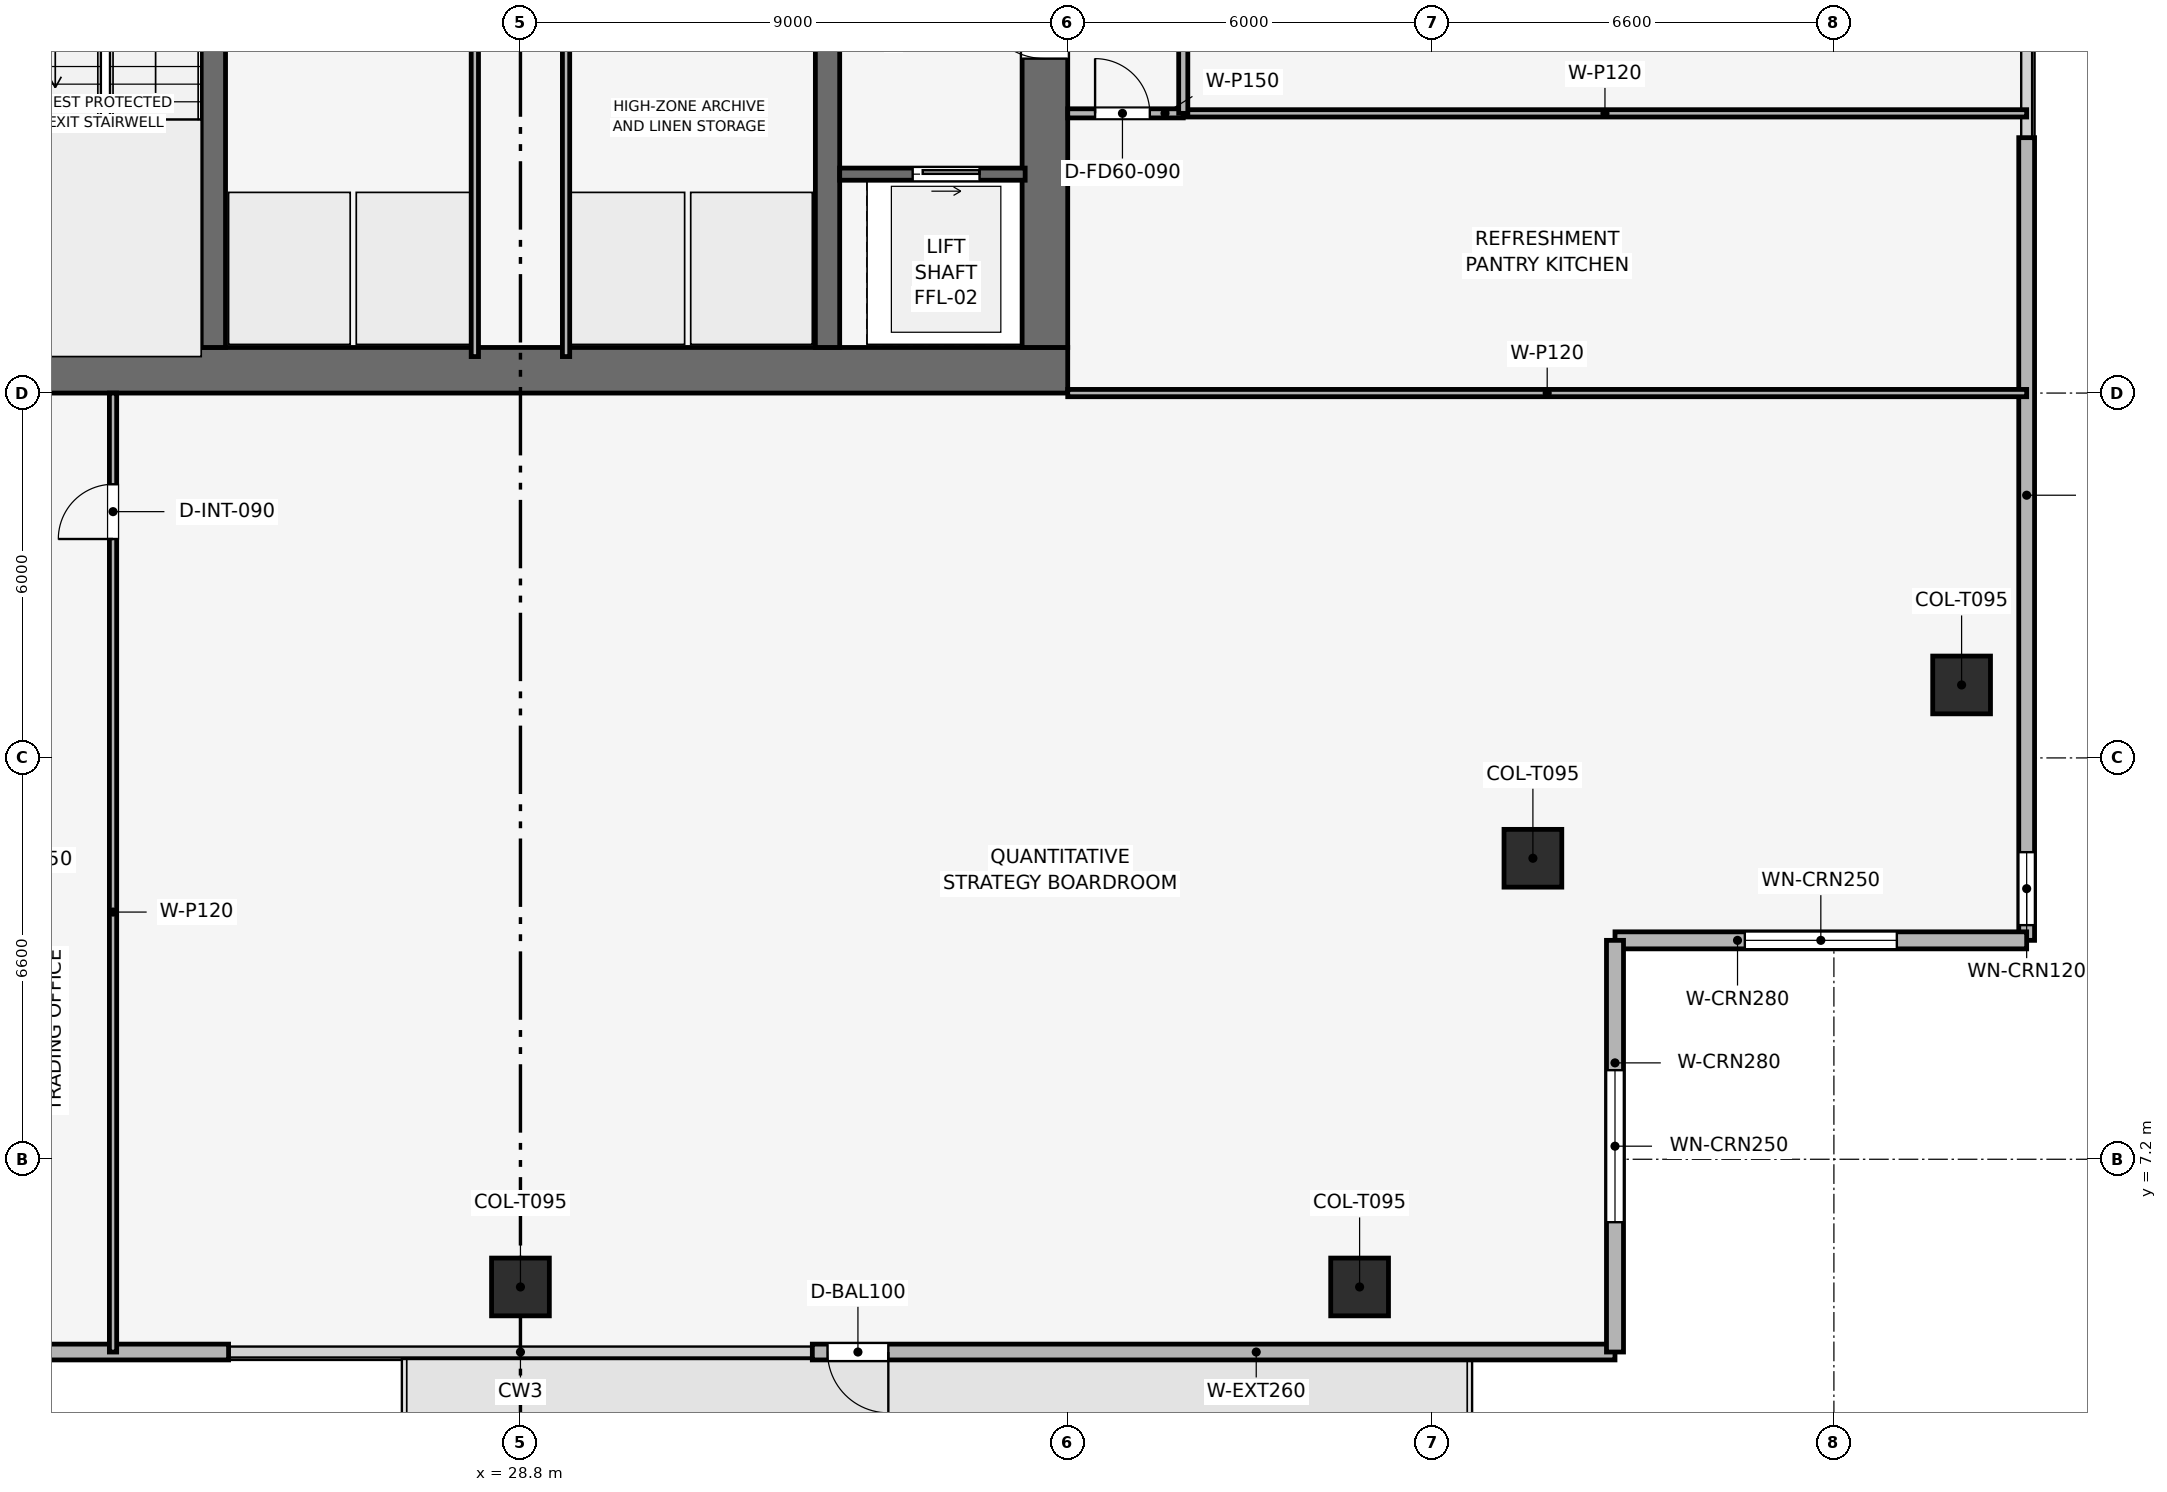
"""IFC4 building model, lengths in metres.
Left out: names, types, materials, properties, quantities, classifications, styles, units other than length and angle.
Written with IfcOpenShell. Run it as: python <this file> out.ifc"""

import sys

from ifc_helpers import new_model, si_unit, direction, frame, frame_2d, origin, origin_2d, place, context, subcontext, project, spatial, rectangle, extrude, element, fill, save


model = new_model("IFC4")
c1 = context("Model", 3, precision=1e-05, world=origin(), true_north=direction((0.0, 1.0)))
c2 = subcontext(c1, "Body", "Model", "MODEL_VIEW")
j1 = project(units=[si_unit("LENGTHUNIT", "METRE"), si_unit("PLANEANGLEUNIT", "RADIAN")], contexts=[c1])
p1 = place(None, origin())
s1 = spatial("IfcSite", under=j1, at=p1, CompositionType="ELEMENT")
p2 = place(p1, origin())
s2 = spatial("IfcBuilding", under=s1, at=p2, CompositionType="ELEMENT")
p3 = place(p2, frame((0.0, 0.0, 269.1)))
s3 = spatial("IfcBuildingStorey", under=s2, at=p3, CompositionType="ELEMENT", Elevation=269.1)
p4 = place(p3, frame((19.8, 20.175, 0.0), z_axis=(0.0, 0.0, 1.0), x_axis=(1.0, 0.0, 0.0)))
e1 = element("IfcWall", 1, at=p4, inside=s3, PredefinedType="SHEAR", context=c2, shape_type="SweptSolid", body=[
    extrude(rectangle(XDim=18.0, YDim=0.75, at=frame_2d((9.0, 0.0))), origin(), (0.0, 0.0, 1.0), 3.75),
])
p5 = place(p3, frame((37.425, 20.55, 0.0), z_axis=(0.0, 0.0, 1.0), x_axis=(0.0, 1.0, 0.0)))
e2 = element("IfcWall", 2, at=p5, inside=s3, PredefinedType="SHEAR", context=c2, shape_type="SweptSolid", body=[
    extrude(rectangle(XDim=16.5, YDim=0.75, at=frame_2d((8.25, 0.0))), origin(), (0.0, 0.0, 1.0), 3.75),
])
p6 = place(p5, frame((4.75, 0.0, 0.0)))
e3 = element("IfcOpeningElement", 3, at=p6, cuts=e2, PredefinedType="OPENING", context=c2, shape_type="SweptSolid", body=[
    extrude(rectangle(XDim=1.1, YDim=2.15, at=frame_2d((0.55, 1.075))), frame((0.0, 0.385, 0.0), z_axis=(0.0, -1.0, 0.0), x_axis=(1.0, 0.0, 0.0)), (0.0, 0.0, 1.0), 0.77),
])
for number, where, z_axis, x_axis in (
    (4, (23.75, 20.55, 0.0), (0.0, 0.0, 1.0), (0.0, 1.0, 0.0)),
    (5, (33.85, 20.55, 0.0), (0.0, 0.0, 1.0), (0.0, 1.0, 0.0)),
):
    element("IfcWall", number, at=place(p3, frame(where, z_axis=z_axis, x_axis=x_axis)), inside=s3, PredefinedType="SHEAR", context=c2, shape_type="SweptSolid", body=[
        extrude(rectangle(XDim=16.5, YDim=0.4, at=frame_2d((8.25, 0.0))), origin(), (0.0, 0.0, 1.0), 3.75),
    ])
for number, where, z_axis, x_axis in (
    (6, (28.8, 5.1, 0.003), (0.0, 0.0, 1.0), (1.0, 0.0, 0.0)),
    (7, (42.6, 5.1, 0.003), (0.0, 0.0, 1.0), (1.0, 0.0, 0.0)),
    (8, (52.5, 15.0, 0.003), (0.0, 0.0, 1.0), (1.0, 0.0, 0.0)),
    (9, (45.45, 12.15, 0.003), (0.0, 0.0, 1.0), (1.0, 0.0, 0.0)),
):
    element("IfcColumn", number, at=place(p3, frame(where, z_axis=z_axis, x_axis=x_axis)), inside=s3, PredefinedType="COLUMN", context=c2, shape_type="SweptSolid", body=[
        extrude(rectangle(XDim=0.95, YDim=0.95, at=origin_2d()), origin(), (0.0, 0.0, 1.0), 3.494),
    ])
p7 = place(p3, frame((46.8, 4.03, 0.0), z_axis=(0.0, 0.0, 1.0), x_axis=(-1.0, 0.0, 0.0)))
e10 = element("IfcWall", 10, at=p7, inside=s3, PredefinedType="SOLIDWALL", context=c2, shape_type="SweptSolid", body=[
    extrude(rectangle(XDim=13.2, YDim=0.26, at=frame_2d((6.6, 0.0))), origin(), (0.0, 0.0, 1.0), 3.5),
])
p8 = place(p7, frame((11.95, 0.0, 0.0)))
e11 = element("IfcOpeningElement", 11, at=p8, cuts=e10, PredefinedType="OPENING", context=c2, shape_type="SweptSolid", body=[
    extrude(rectangle(XDim=1.0, YDim=2.2, at=frame_2d((0.5, 1.1))), frame((0.0, 0.14, 0.0), z_axis=(0.0, -1.0, 0.0), x_axis=(1.0, 0.0, 0.0)), (0.0, 0.0, 1.0), 0.28),
])
p9 = place(p3, frame((24.0, 4.03, 0.0), z_axis=(0.0, 0.0, 1.0), x_axis=(-1.0, 0.0, 0.0)))
e12 = element("IfcWall", 12, at=p9, inside=s3, PredefinedType="SOLIDWALL", context=c2, shape_type="SweptSolid", body=[
    extrude(rectangle(XDim=13.2, YDim=0.26, at=frame_2d((6.6, 0.0))), origin(), (0.0, 0.0, 1.0), 3.5),
])
p10 = place(p9, frame((11.75, 0.0, 0.9)))
e13 = element("IfcOpeningElement", 13, at=p10, cuts=e12, PredefinedType="OPENING", context=c2, shape_type="SweptSolid", body=[
    extrude(rectangle(XDim=1.2, YDim=2.1, at=frame_2d((0.6, 1.05))), frame((0.0, 0.14, 0.0), z_axis=(0.0, -1.0, 0.0), x_axis=(1.0, 0.0, 0.0)), (0.0, 0.0, 1.0), 0.28),
])
p11 = place(p3, frame((53.57, 24.0, 0.0), z_axis=(0.0, 0.0, 1.0), x_axis=(0.0, -1.0, 0.0)))
e14 = element("IfcWall", 14, at=p11, inside=s3, PredefinedType="SOLIDWALL", context=c2, shape_type="SweptSolid", body=[
    extrude(rectangle(XDim=13.2, YDim=0.26, at=frame_2d((6.6, 0.0))), origin(), (0.0, 0.0, 1.0), 3.5),
])
p12 = place(p11, frame((11.75, 0.0, 0.9)))
e15 = element("IfcOpeningElement", 15, at=p12, cuts=e14, PredefinedType="OPENING", context=c2, shape_type="SweptSolid", body=[
    extrude(rectangle(XDim=1.2, YDim=2.1, at=frame_2d((0.6, 1.05))), frame((0.0, 0.14, 0.0), z_axis=(0.0, -1.0, 0.0), x_axis=(1.0, 0.0, 0.0)), (0.0, 0.0, 1.0), 0.28),
])
p13 = place(p3, frame((53.57, 10.8, 0.0), z_axis=(0.0, 0.0, 1.0), x_axis=(-1.0, 0.0, 0.0)))
e16 = element("IfcWall", 16, at=p13, inside=s3, PredefinedType="SOLIDWALL", context=c2, shape_type="SweptSolid", body=[
    extrude(rectangle(XDim=6.77, YDim=0.28, at=frame_2d((3.385, 0.0))), origin(), (0.0, 0.0, 1.0), 3.5),
])
p14 = place(p13, frame((2.135, 0.0, 0.9)))
e17 = element("IfcOpeningElement", 17, at=p14, cuts=e16, PredefinedType="OPENING", context=c2, shape_type="SweptSolid", body=[
    extrude(rectangle(XDim=2.5, YDim=1.9, at=frame_2d((1.25, 0.95))), frame((0.0, 0.15, 0.0), z_axis=(0.0, -1.0, 0.0), x_axis=(1.0, 0.0, 0.0)), (0.0, 0.0, 1.0), 0.3),
])
p15 = place(p3, frame((46.8, 10.8, 0.0), z_axis=(0.0, 0.0, 1.0), x_axis=(0.0, -1.0, 0.0)))
e18 = element("IfcWall", 18, at=p15, inside=s3, PredefinedType="SOLIDWALL", context=c2, shape_type="SweptSolid", body=[
    extrude(rectangle(XDim=6.77, YDim=0.28, at=frame_2d((3.385, 0.0))), origin(), (0.0, 0.0, 1.0), 3.5),
])
p16 = place(p15, frame((2.135, 0.0, 0.9)))
e19 = element("IfcOpeningElement", 19, at=p16, cuts=e18, PredefinedType="OPENING", context=c2, shape_type="SweptSolid", body=[
    extrude(rectangle(XDim=2.5, YDim=1.9, at=frame_2d((1.25, 0.95))), frame((0.0, 0.15, 0.0), z_axis=(0.0, -1.0, 0.0), x_axis=(1.0, 0.0, 0.0)), (0.0, 0.0, 1.0), 0.3),
])
p17 = place(p3, frame((34.05, 23.4, 0.0), z_axis=(0.0, 0.0, 1.0), x_axis=(1.0, 0.0, 0.0)))
e20 = element("IfcWall", 20, at=p17, inside=s3, PredefinedType="SHEAR", context=c2, shape_type="SweptSolid", body=[
    extrude(rectangle(XDim=3.05, YDim=0.2, at=frame_2d((1.525, 0.0))), origin(), (0.0, 0.0, 1.0), 3.5),
])
p18 = place(p17, frame((1.2, 0.0, 0.0)))
e21 = element("IfcOpeningElement", 21, at=p18, cuts=e20, PredefinedType="OPENING", context=c2, shape_type="SweptSolid", body=[
    extrude(rectangle(XDim=1.1, YDim=2.15, at=frame_2d((0.55, 1.075))), frame((0.0, 0.11, 0.0), z_axis=(0.0, -1.0, 0.0), x_axis=(1.0, 0.0, 0.0)), (0.0, 0.0, 1.0), 0.22),
])
for number, where, z_axis, x_axis in (
    (22, (28.05, 20.4, 0.0), (0.0, 0.0, 1.0), (0.0, 1.0, 0.0)),
    (23, (29.55, 20.4, 0.0), (0.0, 0.0, 1.0), (0.0, 1.0, 0.0)),
):
    element("IfcWall", number, at=place(p3, frame(where, z_axis=z_axis, x_axis=x_axis)), inside=s3, PredefinedType="PARTITIONING", context=c2, shape_type="SweptSolid", body=[
        extrude(rectangle(XDim=8.15, YDim=0.12, at=frame_2d((4.075, 0.0))), origin(), (0.0, 0.0, 1.0), 3.5),
    ])
p19 = place(p3, frame((22.1, 4.03, 0.0), z_axis=(0.0, 0.0, 1.0), x_axis=(0.0, 1.0, 0.0)))
e24 = element("IfcWall", 24, at=p19, inside=s3, PredefinedType="PARTITIONING", context=c2, shape_type="SweptSolid", body=[
    extrude(rectangle(XDim=15.77, YDim=0.12, at=frame_2d((7.885, 0.0))), origin(), (0.0, 0.0, 1.0), 3.085),
])
p20 = place(p19, frame((13.37, 0.0, 0.0)))
e25 = element("IfcOpeningElement", 25, at=p20, cuts=e24, PredefinedType="OPENING", context=c2, shape_type="SweptSolid", body=[
    extrude(rectangle(XDim=0.9, YDim=2.1, at=frame_2d((0.45, 1.05))), frame((0.0, 0.07, 0.0), z_axis=(0.0, -1.0, 0.0), x_axis=(1.0, 0.0, 0.0)), (0.0, 0.0, 1.0), 0.14),
])
p21 = place(p3, frame((37.8, 19.8, 0.0), z_axis=(0.0, 0.0, 1.0), x_axis=(1.0, 0.0, 0.0)))
e26 = element("IfcWall", 26, at=p21, inside=s3, PredefinedType="PARTITIONING", context=c2, shape_type="SweptSolid", body=[
    extrude(rectangle(XDim=15.77, YDim=0.12, at=frame_2d((7.885, 0.0))), origin(), (0.0, 0.0, 1.0), 3.085),
])
p22 = place(p3, frame((37.8, 24.4, 0.0), z_axis=(0.0, 0.0, 1.0), x_axis=(1.0, 0.0, 0.0)))
e27 = element("IfcWall", 27, at=p22, inside=s3, PredefinedType="PARTITIONING", context=c2, shape_type="SweptSolid", body=[
    extrude(rectangle(XDim=1.9, YDim=0.15, at=frame_2d((0.95, 0.0))), origin(), (0.0, 0.0, 1.0), 3.5),
])
p23 = place(p22, frame((0.45, 0.0, 0.0)))
e28 = element("IfcOpeningElement", 28, at=p23, cuts=e27, PredefinedType="OPENING", context=c2, shape_type="SweptSolid", body=[
    extrude(rectangle(XDim=0.9, YDim=2.1, at=frame_2d((0.45, 1.05))), frame((0.0, 0.085, 0.0), z_axis=(0.0, -1.0, 0.0), x_axis=(1.0, 0.0, 0.0)), (0.0, 0.0, 1.0), 0.17),
])
p24 = place(p3, frame((39.7, 24.4, 0.0), z_axis=(0.0, 0.0, 1.0), x_axis=(1.0, 0.0, 0.0)))
e29 = element("IfcWall", 29, at=p24, inside=s3, PredefinedType="PARTITIONING", context=c2, shape_type="SweptSolid", body=[
    extrude(rectangle(XDim=13.87, YDim=0.12, at=frame_2d((6.935, 0.0))), origin(), (0.0, 0.0, 1.0), 3.085),
])
p25 = place(p3, frame((39.7, 24.4, 0.0), z_axis=(0.0, 0.0, 1.0), x_axis=(0.0, 1.0, 0.0)))
e30 = element("IfcWall", 30, at=p25, inside=s3, PredefinedType="PARTITIONING", context=c2, shape_type="SweptSolid", body=[
    extrude(rectangle(XDim=15.3, YDim=0.15, at=frame_2d((7.65, 0.0))), origin(), (0.0, 0.0, 1.0), 3.085),
])
p26 = place(p25, frame((1.35, 0.0, 0.0)))
e31 = element("IfcOpeningElement", 31, at=p26, cuts=e30, PredefinedType="OPENING", context=c2, shape_type="SweptSolid", body=[
    extrude(rectangle(XDim=0.9, YDim=2.1, at=frame_2d((0.45, 1.05))), frame((0.0, 0.085, 0.0), z_axis=(0.0, -1.0, 0.0), x_axis=(1.0, 0.0, 0.0)), (0.0, 0.0, 1.0), 0.17),
])
p27 = place(p25, frame((4.55, 0.0, 0.0)))
e32 = element("IfcOpeningElement", 32, at=p27, cuts=e30, PredefinedType="OPENING", context=c2, shape_type="SweptSolid", body=[
    extrude(rectangle(XDim=0.9, YDim=2.1, at=frame_2d((0.45, 1.05))), frame((0.0, 0.085, 0.0), z_axis=(0.0, -1.0, 0.0), x_axis=(1.0, 0.0, 0.0)), (0.0, 0.0, 1.0), 0.17),
])
p28 = place(p25, frame((7.45, 0.0, 0.0)))
e33 = element("IfcOpeningElement", 33, at=p28, cuts=e30, PredefinedType="OPENING", context=c2, shape_type="SweptSolid", body=[
    extrude(rectangle(XDim=0.9, YDim=2.1, at=frame_2d((0.45, 1.05))), frame((0.0, 0.085, 0.0), z_axis=(0.0, -1.0, 0.0), x_axis=(1.0, 0.0, 0.0)), (0.0, 0.0, 1.0), 0.17),
])
p29 = place(p25, frame((10.2, 0.0, 0.0)))
e34 = element("IfcOpeningElement", 34, at=p29, cuts=e30, PredefinedType="OPENING", context=c2, shape_type="SweptSolid", body=[
    extrude(rectangle(XDim=0.95, YDim=2.1, at=frame_2d((0.475, 1.05))), frame((0.0, 0.085, 0.0), z_axis=(0.0, -1.0, 0.0), x_axis=(1.0, 0.0, 0.0)), (0.0, 0.0, 1.0), 0.17),
])
p30 = place(p25, frame((13.2, 0.0, 0.0)))
e35 = element("IfcOpeningElement", 35, at=p30, cuts=e30, PredefinedType="OPENING", context=c2, shape_type="SweptSolid", body=[
    extrude(rectangle(XDim=0.9, YDim=2.1, at=frame_2d((0.45, 1.05))), frame((0.0, 0.085, 0.0), z_axis=(0.0, -1.0, 0.0), x_axis=(1.0, 0.0, 0.0)), (0.0, 0.0, 1.0), 0.17),
])
p31 = place(p8, origin())
e36 = element("IfcDoor", 36, at=p31, inside=s3, OperationType="SINGLE_SWING_LEFT", PredefinedType="DOOR", context=c2, shape_type="SweptSolid", body=[
    extrude(rectangle(XDim=1.0, YDim=2.2, at=frame_2d((0.5, 1.1))), frame((0.0, 0.025, 0.0), z_axis=(0.0, -1.0, 0.0), x_axis=(1.0, 0.0, 0.0)), (0.0, 0.0, 1.0), 0.05),
])
fill(e11, e36)
p32 = place(p12, origin())
e37 = element("IfcWindow", 37, at=p32, inside=s3, PartitioningType="SINGLE_PANEL", PredefinedType="WINDOW", context=c2, shape_type="SweptSolid", body=[
    extrude(rectangle(XDim=1.2, YDim=2.1, at=frame_2d((0.6, 1.05))), frame((0.0, 0.03, 0.0), z_axis=(0.0, -1.0, 0.0), x_axis=(1.0, 0.0, 0.0)), (0.0, 0.0, 1.0), 0.06),
])
fill(e15, e37)
p33 = place(p14, origin())
e38 = element("IfcWindow", 38, at=p33, inside=s3, PartitioningType="SINGLE_PANEL", PredefinedType="WINDOW", context=c2, shape_type="SweptSolid", body=[
    extrude(rectangle(XDim=2.5, YDim=1.9, at=frame_2d((1.25, 0.95))), frame((0.0, 0.03, 0.0), z_axis=(0.0, -1.0, 0.0), x_axis=(1.0, 0.0, 0.0)), (0.0, 0.0, 1.0), 0.06),
])
fill(e17, e38)
p34 = place(p16, origin())
e39 = element("IfcWindow", 39, at=p34, inside=s3, PartitioningType="SINGLE_PANEL", PredefinedType="WINDOW", context=c2, shape_type="SweptSolid", body=[
    extrude(rectangle(XDim=2.5, YDim=1.9, at=frame_2d((1.25, 0.95))), frame((0.0, 0.03, 0.0), z_axis=(0.0, -1.0, 0.0), x_axis=(1.0, 0.0, 0.0)), (0.0, 0.0, 1.0), 0.06),
])
fill(e19, e39)
p35 = place(p18, origin())
e40 = element("IfcDoor", 40, at=p35, inside=s3, OperationType="SLIDING_TO_RIGHT", PredefinedType="DOOR", context=c2, shape_type="SweptSolid", body=[
    extrude(rectangle(XDim=1.1, YDim=2.15, at=frame_2d((0.55, 1.075))), frame((0.0, 0.025, 0.0), z_axis=(0.0, -1.0, 0.0), x_axis=(1.0, 0.0, 0.0)), (0.0, 0.0, 1.0), 0.05),
])
fill(e21, e40)
p36 = place(p20, origin())
e41 = element("IfcDoor", 41, at=p36, inside=s3, OperationType="SINGLE_SWING_LEFT", PredefinedType="DOOR", context=c2, shape_type="SweptSolid", body=[
    extrude(rectangle(XDim=0.9, YDim=2.1, at=frame_2d((0.45, 1.05))), frame((0.0, 0.025, 0.0), z_axis=(0.0, -1.0, 0.0), x_axis=(1.0, 0.0, 0.0)), (0.0, 0.0, 1.0), 0.05),
])
fill(e25, e41)
p37 = place(p23, origin())
e42 = element("IfcDoor", 42, at=p37, inside=s3, OperationType="SINGLE_SWING_LEFT", PredefinedType="DOOR", context=c2, shape_type="SweptSolid", body=[
    extrude(rectangle(XDim=0.9, YDim=2.1, at=frame_2d((0.45, 1.05))), frame((0.0, 0.025, 0.0), z_axis=(0.0, -1.0, 0.0), x_axis=(1.0, 0.0, 0.0)), (0.0, 0.0, 1.0), 0.05),
])
fill(e28, e42)
p38 = place(p6, origin())
e43 = element("IfcDoor", 43, at=p38, inside=s3, OperationType="SINGLE_SWING_RIGHT", PredefinedType="DOOR", context=c2, shape_type="SweptSolid", body=[
    extrude(rectangle(XDim=1.1, YDim=2.15, at=frame_2d((0.55, 1.075))), frame((0.0, 0.025, 0.0), z_axis=(0.0, -1.0, 0.0), x_axis=(1.0, 0.0, 0.0)), (0.0, 0.0, 1.0), 0.05),
])
fill(e3, e43)
save(model, sys.argv[1])
